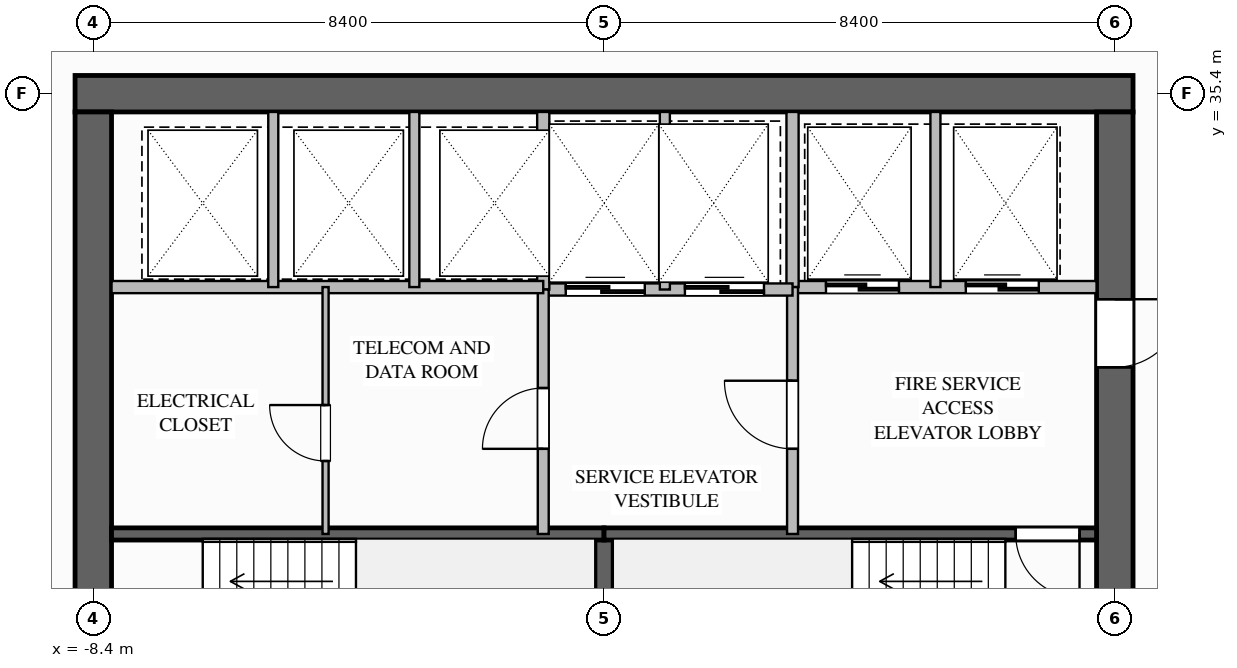
"""IFC4 building model, lengths in metres.
Left out: names, types, materials, properties, quantities, classifications, styles, units other than length and angle.
Written with IfcOpenShell. Run it as: python <this file> out.ifc"""

import sys

from ifc_helpers import new_model, si_unit, direction, frame, frame_2d, origin, place, context, subcontext, project, spatial, rectangle, extrude, element, fill, save


model = new_model("IFC4")
c1 = context("Model", 3, precision=1e-05, world=origin(), true_north=direction((0.0, 1.0)))
c2 = subcontext(c1, "Body", "Model", "MODEL_VIEW")
j1 = project(units=[si_unit("LENGTHUNIT", "METRE"), si_unit("PLANEANGLEUNIT", "RADIAN")], contexts=[c1])
p1 = place(None, origin())
s1 = spatial("IfcSite", under=j1, at=p1, CompositionType="ELEMENT")
p2 = place(p1, origin())
s2 = spatial("IfcBuilding", under=s1, at=p2, CompositionType="ELEMENT")
p3 = place(p2, frame((0.0, 0.0, 61.2)))
s3 = spatial("IfcBuildingStorey", under=s2, at=p3, CompositionType="ELEMENT", Elevation=61.2)
p4 = place(p3, frame((-8.7, 35.4, 0.0), z_axis=(0.0, 0.0, 1.0), x_axis=(1.0, 0.0, 0.0)))
e1 = element("IfcWall", 1, at=p4, inside=s3, PredefinedType="SHEAR", context=c2, shape_type="SweptSolid", body=[
    extrude(rectangle(XDim=17.4, YDim=0.6, at=frame_2d((8.7, 0.0))), origin(), (0.0, 0.0, 1.0), 3.5),
])
p5 = place(p3, frame((8.4, 35.1, 0.0), z_axis=(0.0, 0.0, 1.0), x_axis=(0.0, -1.0, 0.0)))
e2 = element("IfcWall", 2, at=p5, inside=s3, PredefinedType="SHEAR", context=c2, shape_type="SweptSolid", body=[
    extrude(rectangle(XDim=16.2, YDim=0.6, at=frame_2d((8.1, 0.0))), origin(), (0.0, 0.0, 1.0), 3.5),
])
p6 = place(p5, frame((3.08, 0.0, 0.0)))
e3 = element("IfcOpeningElement", 3, at=p6, cuts=e2, PredefinedType="OPENING", context=c2, shape_type="SweptSolid", body=[
    extrude(rectangle(XDim=1.12, YDim=2.1, at=frame_2d((0.56, 1.05))), frame((0.0, 0.31, 0.0), z_axis=(0.0, -1.0, 0.0), x_axis=(1.0, 0.0, 0.0)), (0.0, 0.0, 1.0), 0.62),
])
p7 = place(p3, frame((-8.4, 18.9, 0.0), z_axis=(0.0, 0.0, 1.0), x_axis=(0.0, 1.0, 0.0)))
e4 = element("IfcWall", 4, at=p7, inside=s3, PredefinedType="SHEAR", context=c2, shape_type="SweptSolid", body=[
    extrude(rectangle(XDim=16.2, YDim=0.6, at=frame_2d((8.1, 0.0))), origin(), (0.0, 0.0, 1.0), 3.5),
])
p8 = place(p7, frame((3.9, 0.0, 0.0)))
e5 = element("IfcOpeningElement", 5, at=p8, cuts=e4, PredefinedType="OPENING", context=c2, shape_type="SweptSolid", body=[
    extrude(rectangle(XDim=1.08, YDim=2.04, at=frame_2d((0.54, 1.02))), frame((0.0, 0.31, 0.0), z_axis=(0.0, -1.0, 0.0), x_axis=(1.0, 0.0, 0.0)), (0.0, 0.0, 1.0), 0.62),
])
p9 = place(p3, frame((0.0, 25.04, 0.0), z_axis=(0.0, 0.0, 1.0), x_axis=(0.0, 1.0, 0.0)))
e6 = element("IfcWall", 6, at=p9, inside=s3, PredefinedType="SOLIDWALL", context=c2, shape_type="SweptSolid", body=[
    extrude(rectangle(XDim=3.12, YDim=0.3, at=frame_2d((1.56, 0.0))), origin(), (0.0, 0.0, 1.0), 3.24),
])
p10 = place(p3, frame((-8.1, 28.16, 0.0), z_axis=(0.0, 0.0, 1.0), x_axis=(1.0, 0.0, 0.0)))
e7 = element("IfcWall", 7, at=p10, inside=s3, PredefinedType="SOLIDWALL", context=c2, shape_type="SweptSolid", body=[
    extrude(rectangle(XDim=8.1, YDim=0.2, at=frame_2d((4.05, 0.0))), origin(), (0.0, 0.0, 1.0), 3.24),
])
p11 = place(p3, frame((8.1, 28.16, 0.0), z_axis=(0.0, 0.0, 1.0), x_axis=(-1.0, 0.0, 0.0)))
e8 = element("IfcWall", 8, at=p11, inside=s3, PredefinedType="SOLIDWALL", context=c2, shape_type="SweptSolid", body=[
    extrude(rectangle(XDim=8.1, YDim=0.2, at=frame_2d((4.05, 0.0))), origin(), (0.0, 0.0, 1.0), 3.24),
])
p12 = place(p11, frame((0.28, 0.0, 0.0)))
e9 = element("IfcOpeningElement", 9, at=p12, cuts=e8, PredefinedType="OPENING", context=c2, shape_type="SweptSolid", body=[
    extrude(rectangle(XDim=1.05, YDim=2.1, at=frame_2d((0.525, 1.05))), frame((0.0, 0.11, 0.0), z_axis=(0.0, -1.0, 0.0), x_axis=(1.0, 0.0, 0.0)), (0.0, 0.0, 1.0), 0.22),
])
p13 = place(p3, frame((3.1, 32.22, 0.0), z_axis=(0.0, 0.0, 1.0), x_axis=(1.0, 0.0, 0.0)))
e10 = element("IfcWall", 10, at=p13, inside=s3, PredefinedType="SOLIDWALL", context=c2, shape_type="SweptSolid", body=[
    extrude(rectangle(XDim=5.0, YDim=0.2, at=frame_2d((2.5, 0.0))), origin(), (0.0, 0.0, 1.0), 3.24),
])
p14 = place(p13, frame((0.55, 0.0, 0.0)))
e11 = element("IfcOpeningElement", 11, at=p14, cuts=e10, PredefinedType="OPENING", context=c2, shape_type="SweptSolid", body=[
    extrude(rectangle(XDim=1.2, YDim=2.2, at=frame_2d((0.6, 1.1))), frame((0.0, 0.11, 0.0), z_axis=(0.0, -1.0, 0.0), x_axis=(1.0, 0.0, 0.0)), (0.0, 0.0, 1.0), 0.22),
])
p15 = place(p13, frame((2.85, 0.0, 0.0)))
e12 = element("IfcOpeningElement", 12, at=p15, cuts=e10, PredefinedType="OPENING", context=c2, shape_type="SweptSolid", body=[
    extrude(rectangle(XDim=1.2, YDim=2.2, at=frame_2d((0.6, 1.1))), frame((0.0, 0.11, 0.0), z_axis=(0.0, -1.0, 0.0), x_axis=(1.0, 0.0, 0.0)), (0.0, 0.0, 1.0), 0.22),
])
p16 = place(p3, frame((3.1, 32.22, 0.0), z_axis=(0.0, 0.0, 1.0), x_axis=(0.0, 1.0, 0.0)))
e13 = element("IfcWall", 13, at=p16, inside=s3, PredefinedType="SOLIDWALL", context=c2, shape_type="SweptSolid", body=[
    extrude(rectangle(XDim=2.88, YDim=0.2, at=frame_2d((1.44, 0.0))), origin(), (0.0, 0.0, 1.0), 3.24),
])
p17 = place(p3, frame((5.45, 32.22, 0.0), z_axis=(0.0, 0.0, 1.0), x_axis=(0.0, 1.0, 0.0)))
e14 = element("IfcWall", 14, at=p17, inside=s3, PredefinedType="PARTITIONING", context=c2, shape_type="SweptSolid", body=[
    extrude(rectangle(XDim=2.88, YDim=0.165, at=frame_2d((1.44, 0.0))), origin(), (0.0, 0.0, 1.0), 3.24),
])
p18 = place(p3, frame((3.1, 28.16, 0.0), z_axis=(0.0, 0.0, 1.0), x_axis=(0.0, 1.0, 0.0)))
e15 = element("IfcWall", 15, at=p18, inside=s3, PredefinedType="SOLIDWALL", context=c2, shape_type="SweptSolid", body=[
    extrude(rectangle(XDim=4.06, YDim=0.18, at=frame_2d((2.03, 0.0))), origin(), (0.0, 0.0, 1.0), 3.24),
])
p19 = place(p18, frame((1.4, 0.0, 0.0)))
e16 = element("IfcOpeningElement", 16, at=p19, cuts=e15, PredefinedType="OPENING", context=c2, shape_type="SweptSolid", body=[
    extrude(rectangle(XDim=1.12, YDim=2.1, at=frame_2d((0.56, 1.05))), frame((0.0, 0.1, 0.0), z_axis=(0.0, -1.0, 0.0), x_axis=(1.0, 0.0, 0.0)), (0.0, 0.0, 1.0), 0.2),
])
p20 = place(p3, frame((-1.0, 32.18, 0.0), z_axis=(0.0, 0.0, 1.0), x_axis=(1.0, 0.0, 0.0)))
e17 = element("IfcWall", 17, at=p20, inside=s3, PredefinedType="SOLIDWALL", context=c2, shape_type="SweptSolid", body=[
    extrude(rectangle(XDim=4.1, YDim=0.2, at=frame_2d((2.05, 0.0))), origin(), (0.0, 0.0, 1.0), 3.24),
])
p21 = place(p20, frame((0.37, 0.0, 0.0)))
e18 = element("IfcOpeningElement", 18, at=p21, cuts=e17, PredefinedType="OPENING", context=c2, shape_type="SweptSolid", body=[
    extrude(rectangle(XDim=1.3, YDim=2.2, at=frame_2d((0.65, 1.1))), frame((0.0, 0.11, 0.0), z_axis=(0.0, -1.0, 0.0), x_axis=(1.0, 0.0, 0.0)), (0.0, 0.0, 1.0), 0.22),
])
p22 = place(p20, frame((2.33, 0.0, 0.0)))
e19 = element("IfcOpeningElement", 19, at=p22, cuts=e17, PredefinedType="OPENING", context=c2, shape_type="SweptSolid", body=[
    extrude(rectangle(XDim=1.3, YDim=2.2, at=frame_2d((0.65, 1.1))), frame((0.0, 0.11, 0.0), z_axis=(0.0, -1.0, 0.0), x_axis=(1.0, 0.0, 0.0)), (0.0, 0.0, 1.0), 0.22),
])
p23 = place(p3, frame((-1.0, 32.18, 0.0), z_axis=(0.0, 0.0, 1.0), x_axis=(0.0, 1.0, 0.0)))
e20 = element("IfcWall", 20, at=p23, inside=s3, PredefinedType="SOLIDWALL", context=c2, shape_type="SweptSolid", body=[
    extrude(rectangle(XDim=2.92, YDim=0.2, at=frame_2d((1.46, 0.0))), origin(), (0.0, 0.0, 1.0), 3.24),
])
p24 = place(p3, frame((1.0, 32.18, 0.0), z_axis=(0.0, 0.0, 1.0), x_axis=(0.0, 1.0, 0.0)))
e21 = element("IfcWall", 21, at=p24, inside=s3, PredefinedType="PARTITIONING", context=c2, shape_type="SweptSolid", body=[
    extrude(rectangle(XDim=2.92, YDim=0.165, at=frame_2d((1.46, 0.0))), origin(), (0.0, 0.0, 1.0), 3.24),
])
p25 = place(p3, frame((-1.0, 28.16, 0.0), z_axis=(0.0, 0.0, 1.0), x_axis=(0.0, 1.0, 0.0)))
e22 = element("IfcWall", 22, at=p25, inside=s3, PredefinedType="SOLIDWALL", context=c2, shape_type="SweptSolid", body=[
    extrude(rectangle(XDim=4.02, YDim=0.18, at=frame_2d((2.01, 0.0))), origin(), (0.0, 0.0, 1.0), 3.24),
])
p26 = place(p25, frame((1.4, 0.0, 0.0)))
e23 = element("IfcOpeningElement", 23, at=p26, cuts=e22, PredefinedType="OPENING", context=c2, shape_type="SweptSolid", body=[
    extrude(rectangle(XDim=1.0, YDim=2.1, at=frame_2d((0.5, 1.05))), frame((0.0, 0.1, 0.0), z_axis=(0.0, -1.0, 0.0), x_axis=(1.0, 0.0, 0.0)), (0.0, 0.0, 1.0), 0.2),
])
p27 = place(p3, frame((-8.1, 32.22, 0.0), z_axis=(0.0, 0.0, 1.0), x_axis=(1.0, 0.0, 0.0)))
e24 = element("IfcWall", 24, at=p27, inside=s3, PredefinedType="SOLIDWALL", context=c2, shape_type="SweptSolid", body=[
    extrude(rectangle(XDim=7.1, YDim=0.2, at=frame_2d((3.55, 0.0))), origin(), (0.0, 0.0, 1.0), 3.24),
])
for number, where, z_axis, x_axis in (
    (25, (-5.44, 32.22, 0.0), (0.0, 0.0, 1.0), (0.0, 1.0, 0.0)),
    (26, (-3.12, 32.22, 0.0), (0.0, 0.0, 1.0), (0.0, 1.0, 0.0)),
):
    element("IfcWall", number, at=place(p3, frame(where, z_axis=z_axis, x_axis=x_axis)), inside=s3, PredefinedType="PARTITIONING", context=c2, shape_type="SweptSolid", body=[
        extrude(rectangle(XDim=2.88, YDim=0.165, at=frame_2d((1.44, 0.0))), origin(), (0.0, 0.0, 1.0), 3.24),
    ])
p28 = place(p3, frame((-4.58, 28.16, 0.0), z_axis=(0.0, 0.0, 1.0), x_axis=(0.0, 1.0, 0.0)))
e27 = element("IfcWall", 27, at=p28, inside=s3, PredefinedType="PARTITIONING", context=c2, shape_type="SweptSolid", body=[
    extrude(rectangle(XDim=4.06, YDim=0.1, at=frame_2d((2.03, 0.0))), origin(), (0.0, 0.0, 1.0), 3.24),
])
p29 = place(p28, frame((1.2, 0.0, 0.0)))
e28 = element("IfcOpeningElement", 28, at=p29, cuts=e27, PredefinedType="OPENING", context=c2, shape_type="SweptSolid", body=[
    extrude(rectangle(XDim=0.92, YDim=2.1, at=frame_2d((0.46, 1.05))), frame((0.0, 0.06, 0.0), z_axis=(0.0, -1.0, 0.0), x_axis=(1.0, 0.0, 0.0)), (0.0, 0.0, 1.0), 0.12),
])
p30 = place(p12, origin())
e29 = element("IfcDoor", 29, at=p30, inside=s3, OperationType="SINGLE_SWING_LEFT", PredefinedType="DOOR", context=c2, shape_type="SweptSolid", body=[
    extrude(rectangle(XDim=1.05, YDim=2.1, at=frame_2d((0.525, 1.05))), frame((0.0, 0.025, 0.0), z_axis=(0.0, -1.0, 0.0), x_axis=(1.0, 0.0, 0.0)), (0.0, 0.0, 1.0), 0.05),
])
fill(e9, e29)
p31 = place(p14, origin())
e30 = element("IfcDoor", 30, at=p31, inside=s3, OperationType="SLIDING_TO_LEFT", PredefinedType="DOOR", context=c2, shape_type="SweptSolid", body=[
    extrude(rectangle(XDim=1.2, YDim=2.2, at=frame_2d((0.6, 1.1))), frame((0.0, 0.025, 0.0), z_axis=(0.0, -1.0, 0.0), x_axis=(1.0, 0.0, 0.0)), (0.0, 0.0, 1.0), 0.05),
])
fill(e11, e30)
p32 = place(p15, origin())
e31 = element("IfcDoor", 31, at=p32, inside=s3, OperationType="SLIDING_TO_LEFT", PredefinedType="DOOR", context=c2, shape_type="SweptSolid", body=[
    extrude(rectangle(XDim=1.2, YDim=2.2, at=frame_2d((0.6, 1.1))), frame((0.0, 0.025, 0.0), z_axis=(0.0, -1.0, 0.0), x_axis=(1.0, 0.0, 0.0)), (0.0, 0.0, 1.0), 0.05),
])
fill(e12, e31)
p33 = place(p19, origin())
e32 = element("IfcDoor", 32, at=p33, inside=s3, OperationType="SINGLE_SWING_RIGHT", PredefinedType="DOOR", context=c2, shape_type="SweptSolid", body=[
    extrude(rectangle(XDim=1.12, YDim=2.1, at=frame_2d((0.56, 1.05))), frame((0.0, 0.025, 0.0), z_axis=(0.0, -1.0, 0.0), x_axis=(1.0, 0.0, 0.0)), (0.0, 0.0, 1.0), 0.05),
])
fill(e16, e32)
p34 = place(p6, origin())
e33 = element("IfcDoor", 33, at=p34, inside=s3, OperationType="SINGLE_SWING_LEFT", PredefinedType="DOOR", context=c2, shape_type="SweptSolid", body=[
    extrude(rectangle(XDim=1.12, YDim=2.1, at=frame_2d((0.56, 1.05))), frame((0.0, 0.025, 0.0), z_axis=(0.0, -1.0, 0.0), x_axis=(1.0, 0.0, 0.0)), (0.0, 0.0, 1.0), 0.05),
])
fill(e3, e33)
p35 = place(p21, origin())
e34 = element("IfcDoor", 34, at=p35, inside=s3, OperationType="SLIDING_TO_LEFT", PredefinedType="DOOR", context=c2, shape_type="SweptSolid", body=[
    extrude(rectangle(XDim=1.3, YDim=2.2, at=frame_2d((0.65, 1.1))), frame((0.0, 0.025, 0.0), z_axis=(0.0, -1.0, 0.0), x_axis=(1.0, 0.0, 0.0)), (0.0, 0.0, 1.0), 0.05),
])
fill(e18, e34)
p36 = place(p22, origin())
e35 = element("IfcDoor", 35, at=p36, inside=s3, OperationType="SLIDING_TO_LEFT", PredefinedType="DOOR", context=c2, shape_type="SweptSolid", body=[
    extrude(rectangle(XDim=1.3, YDim=2.2, at=frame_2d((0.65, 1.1))), frame((0.0, 0.025, 0.0), z_axis=(0.0, -1.0, 0.0), x_axis=(1.0, 0.0, 0.0)), (0.0, 0.0, 1.0), 0.05),
])
fill(e19, e35)
p37 = place(p26, origin())
e36 = element("IfcDoor", 36, at=p37, inside=s3, OperationType="SINGLE_SWING_LEFT", PredefinedType="DOOR", context=c2, shape_type="SweptSolid", body=[
    extrude(rectangle(XDim=1.0, YDim=2.1, at=frame_2d((0.5, 1.05))), frame((0.0, 0.025, 0.0), z_axis=(0.0, -1.0, 0.0), x_axis=(1.0, 0.0, 0.0)), (0.0, 0.0, 1.0), 0.05),
])
fill(e23, e36)
p38 = place(p29, origin())
e37 = element("IfcDoor", 37, at=p38, inside=s3, OperationType="SINGLE_SWING_RIGHT", PredefinedType="DOOR", context=c2, shape_type="SweptSolid", body=[
    extrude(rectangle(XDim=0.92, YDim=2.1, at=frame_2d((0.46, 1.05))), frame((0.0, 0.025, 0.0), z_axis=(0.0, -1.0, 0.0), x_axis=(1.0, 0.0, 0.0)), (0.0, 0.0, 1.0), 0.05),
])
fill(e28, e37)
save(model, sys.argv[1])
